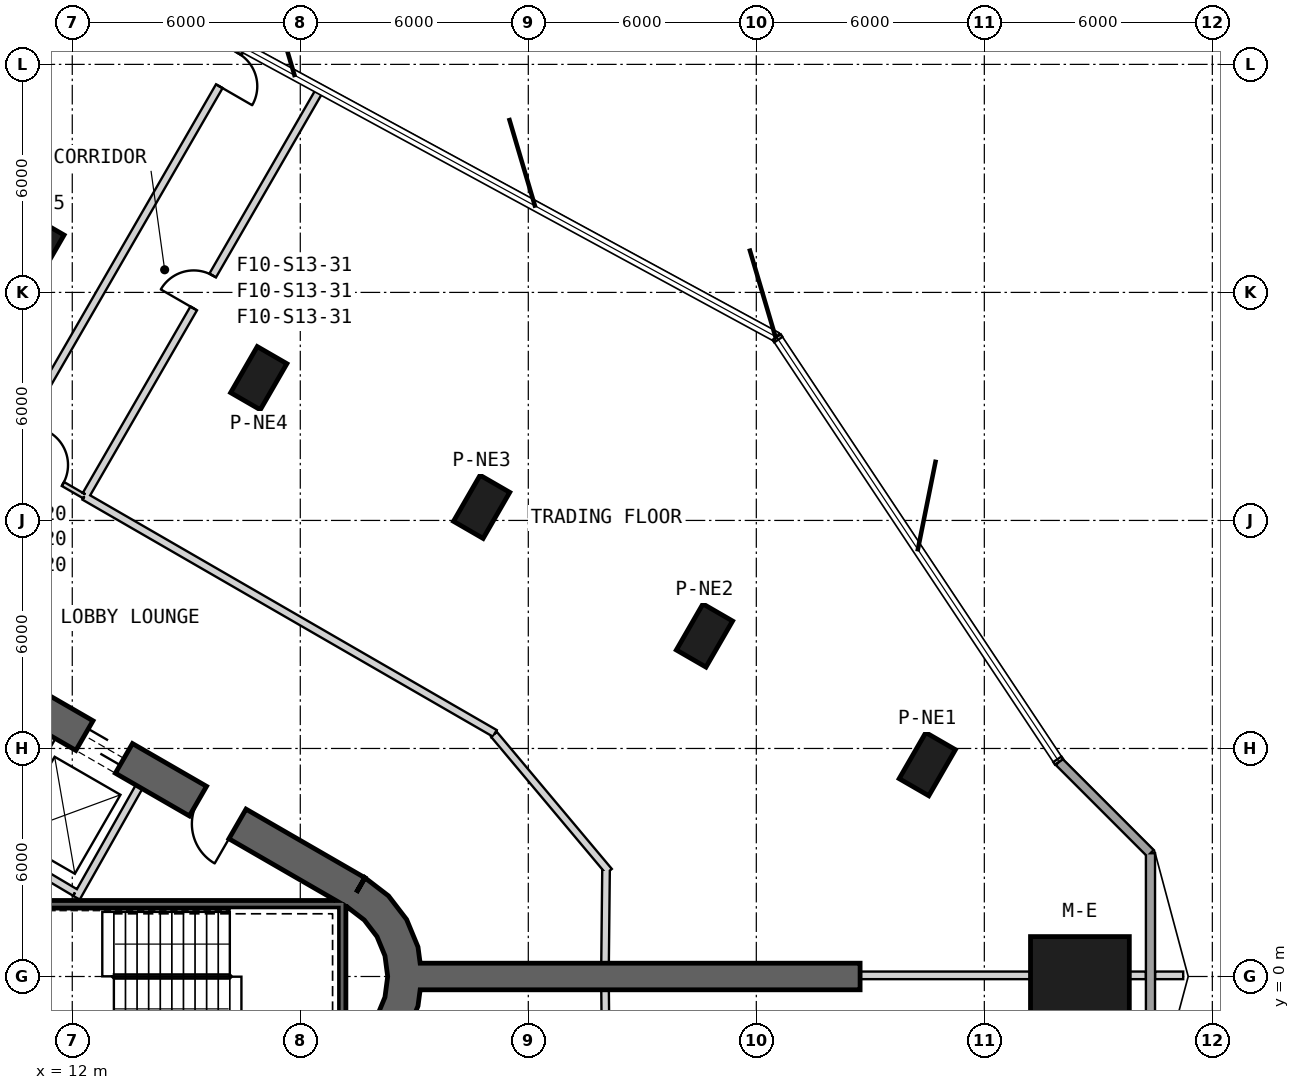
"""IFC4 building model, lengths in metres.
Left out: names, types, materials, properties, quantities, classifications, styles, units other than length and angle.
Written with IfcOpenShell. Run it as: python <this file> out.ifc"""

import sys

from ifc_helpers import new_model, si_unit, direction, frame, frame_2d, origin, origin_2d, place, context, subcontext, project, spatial, polyline, rectangle, outline, extrude, element, fill, save


model = new_model("IFC4")
c1 = context("Model", 3, precision=1e-05, world=origin(), true_north=direction((0.0, 1.0)))
c2 = subcontext(c1, "Body", "Model", "MODEL_VIEW")
j1 = project(units=[si_unit("LENGTHUNIT", "METRE"), si_unit("PLANEANGLEUNIT", "RADIAN")], contexts=[c1])
p1 = place(None, origin())
s1 = spatial("IfcSite", under=j1, at=p1, CompositionType="ELEMENT")
p2 = place(p1, origin())
s2 = spatial("IfcBuilding", under=s1, at=p2, CompositionType="ELEMENT")
p3 = place(p2, frame((0.0, 0.0, 217.2)))
s3 = spatial("IfcBuildingStorey", under=s2, at=p3, CompositionType="ELEMENT", Elevation=217.2)
p4 = place(p3, frame((38.515, 0.0, 0.0), z_axis=(0.0, 0.0, 1.0), x_axis=(1.0, 0.0, 0.0)))
e1 = element("IfcColumn", 1, at=p4, inside=s3, PredefinedType="COLUMN", context=c2, shape_type="SweptSolid", body=[
    extrude(rectangle(XDim=2.6, YDim=2.1, at=origin_2d()), origin(), (0.0, 0.0, 1.0), 4.0),
])
for number, where, z_axis, x_axis in (
    (2, (34.5, 5.587, 0.0), (0.0, 0.0, 1.0), (0.5, 0.866, 0.0)),
    (3, (28.635, 8.972, 0.0), (0.0, 0.0, 1.0), (0.5, 0.866, 0.0)),
    (4, (22.772, 12.358, 0.0), (0.0, 0.0, 1.0), (0.5, 0.866, 0.0)),
    (5, (16.908, 15.743, 0.0), (0.0, 0.0, 1.0), (0.5, 0.866, 0.0)),
    (6, (11.044, 19.129, 0.0), (0.0, 0.0, 1.0), (0.5, 0.866, 0.0)),
):
    element("IfcColumn", number, at=place(p3, frame(where, z_axis=z_axis, x_axis=x_axis)), inside=s3, PredefinedType="COLUMN", context=c2, shape_type="SweptSolid", body=[
        extrude(rectangle(XDim=1.4, YDim=0.9, at=origin_2d()), origin(), (0.0, 0.0, 1.0), 4.0),
    ])
p5 = place(p3, frame((19.475, 2.208, 0.0), z_axis=(0.0, 0.0, 1.0), x_axis=(-0.866028369851, 0.499994862586, 0.0)))
e7 = element("IfcWall", 7, at=p5, inside=s3, PredefinedType="SHEAR", context=c2, shape_type="SweptSolid", body=[
    extrude(rectangle(XDim=31.523, YDim=0.9, at=frame_2d((15.762, 0.0))), origin(), (0.0, 0.0, 1.0), 4.0),
])
p6 = place(p5, frame((7.062, 0.0, 0.0)))
e8 = element("IfcOpeningElement", 8, at=p6, cuts=e7, PredefinedType="OPENING", context=c2, shape_type="SweptSolid", body=[
    extrude(rectangle(XDim=1.2, YDim=2.4, at=frame_2d((0.6, 1.2))), frame((0.0, 0.46, 0.0), z_axis=(0.0, -1.0, 0.0), x_axis=(1.0, 0.0, 0.0)), (0.0, 0.0, 1.0), 0.92),
])
p7 = place(p5, frame((3.612, 0.0, 0.0)))
e9 = element("IfcOpeningElement", 9, at=p7, cuts=e7, PredefinedType="OPENING", context=c2, shape_type="SweptSolid", body=[
    extrude(rectangle(XDim=1.2, YDim=2.4, at=frame_2d((0.6, 1.2))), frame((0.0, 0.46, 0.0), z_axis=(0.0, -1.0, 0.0), x_axis=(1.0, 0.0, 0.0)), (0.0, 0.0, 1.0), 0.92),
])
p8 = place(p5, frame((26.712, 0.0, 0.0)))
e10 = element("IfcOpeningElement", 10, at=p8, cuts=e7, PredefinedType="OPENING", context=c2, shape_type="SweptSolid", body=[
    extrude(rectangle(XDim=1.2, YDim=2.4, at=frame_2d((0.6, 1.2))), frame((0.0, 0.46, 0.0), z_axis=(0.0, -1.0, 0.0), x_axis=(1.0, 0.0, 0.0)), (0.0, 0.0, 1.0), 0.92),
])
p9 = place(p3, origin())
e11 = element("IfcWall", 11, at=p9, inside=s3, PredefinedType="SHEAR", context=c2, shape_type="SweptSolid", body=[
    extrude(outline(polyline([(19.7, -2.598), (20.321, -2.121), (20.798, -1.5), (21.098, -0.777), (21.2, 0.0), (21.098, 0.777), (20.798, 1.5), (20.321, 2.121), (19.7, 2.598), (19.25, 1.819), (19.685, 1.485), (20.019, 1.05), (20.229, 0.543), (20.3, 0.0), (20.229, -0.543), (20.019, -1.05), (19.685, -1.485), (19.25, -1.819), (19.7, -2.598)])), origin(), (0.0, 0.0, 1.0), 4.0),
])
p10 = place(p3, frame((21.15, 0.0, 0.0), z_axis=(0.0, 0.0, 1.0), x_axis=(1.0, 0.0, 0.0)))
e12 = element("IfcWall", 12, at=p10, inside=s3, PredefinedType="SHEAR", context=c2, shape_type="SweptSolid", body=[
    extrude(rectangle(XDim=11.581, YDim=0.7, at=frame_2d((5.791, 0.0))), origin(), (0.0, 0.0, 1.0), 4.0),
])
p11 = place(p3, frame((40.372, -3.243, 0.0), z_axis=(0.0, 0.0, 1.0), x_axis=(0.0, 1.0, 0.0)))
e13 = element("IfcWall", 13, at=p11, inside=s3, PredefinedType="SOLIDWALL", context=c2, shape_type="SweptSolid", body=[
    extrude(rectangle(XDim=6.487, YDim=0.24, at=frame_2d((3.243, 0.0))), origin(), (0.0, 0.0, 1.0), 3.7),
])
p12 = place(p3, frame((40.372, 3.243, 0.0), z_axis=(0.0, 0.0, 1.0), x_axis=(-0.707142664913, 0.707070895639, 0.0)))
e14 = element("IfcWall", 14, at=p12, inside=s3, PredefinedType="SOLIDWALL", context=c2, shape_type="SweptSolid", body=[
    extrude(rectangle(XDim=3.402, YDim=0.24, at=frame_2d((1.701, 0.0))), origin(), (0.0, 0.0, 1.0), 3.7),
])
p13 = place(p3, frame((9.847, 3.495, 0.0), z_axis=(0.0, 0.0, 1.0), x_axis=(0.499984717929, 0.866034226713, 0.0)))
e15 = element("IfcWall", 15, at=p13, inside=s3, PredefinedType="PLUMBINGWALL", context=c2, shape_type="SweptSolid", body=[
    extrude(rectangle(XDim=3.25, YDim=0.2, at=frame_2d((1.625, 0.0))), origin(), (0.0, 0.0, 1.0), 3.7),
])
p14 = place(p3, frame((12.11, 2.073, 0.0), z_axis=(0.0, 0.0, 1.0), x_axis=(0.49196600604, 0.870614408852, 0.0)))
e16 = element("IfcWall", 16, at=p14, inside=s3, PredefinedType="PLUMBINGWALL", context=c2, shape_type="SweptSolid", body=[
    extrude(rectangle(XDim=3.35, YDim=0.2, at=frame_2d((1.675, 0.0))), origin(), (0.0, 0.0, 1.0), 3.7),
])
p15 = place(p3, frame((12.073, 2.211, 0.0), z_axis=(0.0, 0.0, 1.0), x_axis=(-0.860414880418, 0.509594185166, 0.0)))
e17 = element("IfcWall", 17, at=p15, inside=s3, PredefinedType="PLUMBINGWALL", context=c2, shape_type="SweptSolid", body=[
    extrude(rectangle(XDim=2.7, YDim=0.2, at=frame_2d((1.35, 0.0))), origin(), (0.0, 0.0, 1.0), 3.7),
])
p16 = place(p3, frame((19.2, 1.9, -0.3), z_axis=(0.0, 0.0, 1.0), x_axis=(-1.0, 0.0, 0.0)))
e18 = element("IfcWall", 18, at=p16, inside=s3, PredefinedType="SHEAR", context=c2, shape_type="SweptSolid", body=[
    extrude(rectangle(XDim=8.1, YDim=0.2, at=frame_2d((4.05, 0.0))), origin(), (0.0, 0.0, 1.0), 4.0),
])
p17 = place(p3, frame((19.1, -2.0, -0.3), z_axis=(0.0, 0.0, 1.0), x_axis=(0.0, 1.0, 0.0)))
e19 = element("IfcWall", 19, at=p17, inside=s3, PredefinedType="SHEAR", context=c2, shape_type="SweptSolid", body=[
    extrude(rectangle(XDim=3.8, YDim=0.2, at=frame_2d((1.9, 0.0))), origin(), (0.0, 0.0, 1.0), 4.0),
])
p18 = place(p3, frame((10.325, 13.784, 0.0), z_axis=(0.0, 0.0, 1.0), x_axis=(0.86602648383, -0.499998129301, 0.0)))
e20 = element("IfcWall", 20, at=p18, inside=s3, PredefinedType="PARTITIONING", context=c2, shape_type="SweptSolid", body=[
    extrude(rectangle(XDim=2.3, YDim=0.12, at=frame_2d((1.15, 0.0))), origin(), (0.0, 0.0, 1.0), 3.7),
])
p19 = place(p18, frame((0.65, 0.0, 0.0)))
e21 = element("IfcOpeningElement", 21, at=p19, cuts=e20, PredefinedType="OPENING", context=c2, shape_type="SweptSolid", body=[
    extrude(rectangle(XDim=1.0, YDim=2.1, at=frame_2d((0.5, 1.05))), frame((0.0, 0.07, 0.0), z_axis=(0.0, -1.0, 0.0), x_axis=(1.0, 0.0, 0.0)), (0.0, 0.0, 1.0), 0.14),
])
p20 = place(p3, frame((23.119, 6.398, 0.0), z_axis=(0.0, 0.0, 1.0), x_axis=(-0.866027821991, 0.499995811521, 0.0)))
e22 = element("IfcWall", 22, at=p20, inside=s3, PredefinedType="PARTITIONING", context=c2, shape_type="SweptSolid", body=[
    extrude(rectangle(XDim=12.473, YDim=0.2, at=frame_2d((6.236, 0.0))), origin(), (0.0, 0.0, 1.0), 2.88),
])
p21 = place(p3, frame((26.121, 2.766, 0.0), z_axis=(0.0, 0.0, 1.0), x_axis=(-0.642778291452, 0.766052261949, 0.0)))
e23 = element("IfcWall", 23, at=p21, inside=s3, PredefinedType="PARTITIONING", context=c2, shape_type="SweptSolid", body=[
    extrude(rectangle(XDim=4.706, YDim=0.2, at=frame_2d((2.353, 0.0))), origin(), (0.0, 0.0, 1.0), 2.78),
])
p22 = place(p3, frame((26.02, 0.35, 0.0), z_axis=(0.0, 0.0, 1.0), x_axis=(0.010532007244, 0.999944536874, 0.0)))
e24 = element("IfcWall", 24, at=p22, inside=s3, PredefinedType="PARTITIONING", context=c2, shape_type="SweptSolid", body=[
    extrude(rectangle(XDim=2.457, YDim=0.2, at=frame_2d((1.229, 0.0))), origin(), (0.0, 0.0, 1.0), 3.7),
])
p23 = place(p3, frame((26.047, -2.972, 0.0), z_axis=(0.0, 0.0, 1.0), x_axis=(-0.010519853563, 0.99994466481, 0.0)))
e25 = element("IfcWall", 25, at=p23, inside=s3, PredefinedType="PARTITIONING", context=c2, shape_type="SweptSolid", body=[
    extrude(rectangle(XDim=2.623, YDim=0.2, at=frame_2d((1.311, 0.0))), origin(), (0.0, 0.0, 1.0), 3.7),
])
p24 = place(p3, frame((16.469, 24.464, 0.0), z_axis=(0.0, 0.0, 1.0), x_axis=(-0.499989616998, -0.866031398331, 0.0)))
e26 = element("IfcWall", 26, at=p24, inside=s3, PredefinedType="PARTITIONING", context=c2, shape_type="SweptSolid", body=[
    extrude(rectangle(XDim=12.261, YDim=0.2, at=frame_2d((6.13, 0.0))), origin(), (0.0, 0.0, 1.0), 3.7),
])
p25 = place(p24, frame((0.2, 0.0, 0.0)))
e27 = element("IfcOpeningElement", 27, at=p25, cuts=e26, PredefinedType="OPENING", context=c2, shape_type="SweptSolid", body=[
    extrude(rectangle(XDim=1.0, YDim=2.1, at=frame_2d((0.5, 1.05))), frame((0.0, 0.11, 0.0), z_axis=(0.0, -1.0, 0.0), x_axis=(1.0, 0.0, 0.0)), (0.0, 0.0, 1.0), 0.22),
])
p26 = place(p3, frame((12.365, 12.676, 0.0), z_axis=(0.0, 0.0, 1.0), x_axis=(0.500008872635, 0.866020281106, 0.0)))
e28 = element("IfcWall", 28, at=p26, inside=s3, PredefinedType="PARTITIONING", context=c2, shape_type="SweptSolid", body=[
    extrude(rectangle(XDim=12.322, YDim=0.2, at=frame_2d((6.161, 0.0))), origin(), (0.0, 0.0, 1.0), 3.7),
])
p27 = place(p26, frame((5.661, 0.0, 0.0)))
e29 = element("IfcOpeningElement", 29, at=p27, cuts=e28, PredefinedType="OPENING", context=c2, shape_type="SweptSolid", body=[
    extrude(rectangle(XDim=1.0, YDim=2.1, at=frame_2d((0.5, 1.05))), frame((0.0, 0.11, 0.0), z_axis=(0.0, -1.0, 0.0), x_axis=(1.0, 0.0, 0.0)), (0.0, 0.0, 1.0), 0.22),
])
p28 = place(p3, frame((32.731, 0.03, 0.0), z_axis=(0.0, 0.0, 1.0), x_axis=(1.0, 0.0, 0.0)))
e30 = element("IfcWall", 30, at=p28, inside=s3, PredefinedType="PARTITIONING", context=c2, shape_type="SweptSolid", body=[
    extrude(rectangle(XDim=4.484, YDim=0.2, at=frame_2d((2.242, 0.0))), origin(), (0.0, 0.0, 1.0), 3.27),
])
p29 = place(p3, frame((39.815, 0.03, 0.0), z_axis=(0.0, 0.0, 1.0), x_axis=(1.0, 0.0, 0.0)))
e31 = element("IfcWall", 31, at=p29, inside=s3, PredefinedType="PARTITIONING", context=c2, shape_type="SweptSolid", body=[
    extrude(rectangle(XDim=0.437, YDim=0.2, at=frame_2d((0.218, 0.0))), origin(), (0.0, 0.0, 1.0), 3.7),
])
p30 = place(p3, frame((40.492, 0.03, 0.0), z_axis=(0.0, 0.0, 1.0), x_axis=(1.0, 0.0, 0.0)))
e32 = element("IfcWall", 32, at=p30, inside=s3, PredefinedType="PARTITIONING", context=c2, shape_type="SweptSolid", body=[
    extrude(rectangle(XDim=0.741, YDim=0.2, at=frame_2d((0.371, 0.0))), origin(), (0.0, 0.0, 1.0), 3.7),
])
p31 = place(p19, origin())
e33 = element("IfcDoor", 33, at=p31, inside=s3, OperationType="SINGLE_SWING_LEFT", PredefinedType="NOTDEFINED", context=c2, shape_type="SweptSolid", body=[
    extrude(rectangle(XDim=1.0, YDim=2.1, at=frame_2d((0.5, 1.05))), frame((0.0, 0.025, 0.0), z_axis=(0.0, -1.0, 0.0), x_axis=(1.0, 0.0, 0.0)), (0.0, 0.0, 1.0), 0.05),
])
fill(e21, e33)
p32 = place(p25, origin())
e34 = element("IfcDoor", 34, at=p32, inside=s3, OperationType="SINGLE_SWING_LEFT", PredefinedType="USERDEFINED", context=c2, shape_type="SweptSolid", body=[
    extrude(rectangle(XDim=1.0, YDim=2.1, at=frame_2d((0.5, 1.05))), frame((0.0, 0.025, 0.0), z_axis=(0.0, -1.0, 0.0), x_axis=(1.0, 0.0, 0.0)), (0.0, 0.0, 1.0), 0.05),
])
fill(e27, e34)
p33 = place(p27, origin())
e35 = element("IfcDoor", 35, at=p33, inside=s3, OperationType="SINGLE_SWING_LEFT", PredefinedType="USERDEFINED", context=c2, shape_type="SweptSolid", body=[
    extrude(rectangle(XDim=1.0, YDim=2.1, at=frame_2d((0.5, 1.05))), frame((0.0, 0.025, 0.0), z_axis=(0.0, -1.0, 0.0), x_axis=(1.0, 0.0, 0.0)), (0.0, 0.0, 1.0), 0.05),
])
fill(e29, e35)
p34 = place(p6, origin())
e36 = element("IfcDoor", 36, at=p34, inside=s3, OperationType="SLIDING_TO_LEFT", PredefinedType="USERDEFINED", context=c2, shape_type="SweptSolid", body=[
    extrude(rectangle(XDim=1.2, YDim=2.4, at=frame_2d((0.6, 1.2))), frame((0.0, 0.025, 0.0), z_axis=(0.0, -1.0, 0.0), x_axis=(1.0, 0.0, 0.0)), (0.0, 0.0, 1.0), 0.05),
])
fill(e8, e36)
p35 = place(p7, origin())
e37 = element("IfcDoor", 37, at=p35, inside=s3, OperationType="SINGLE_SWING_LEFT", PredefinedType="USERDEFINED", context=c2, shape_type="SweptSolid", body=[
    extrude(rectangle(XDim=1.2, YDim=2.4, at=frame_2d((0.6, 1.2))), frame((0.0, 0.025, 0.0), z_axis=(0.0, -1.0, 0.0), x_axis=(1.0, 0.0, 0.0)), (0.0, 0.0, 1.0), 0.05),
])
fill(e9, e37)
save(model, sys.argv[1])
